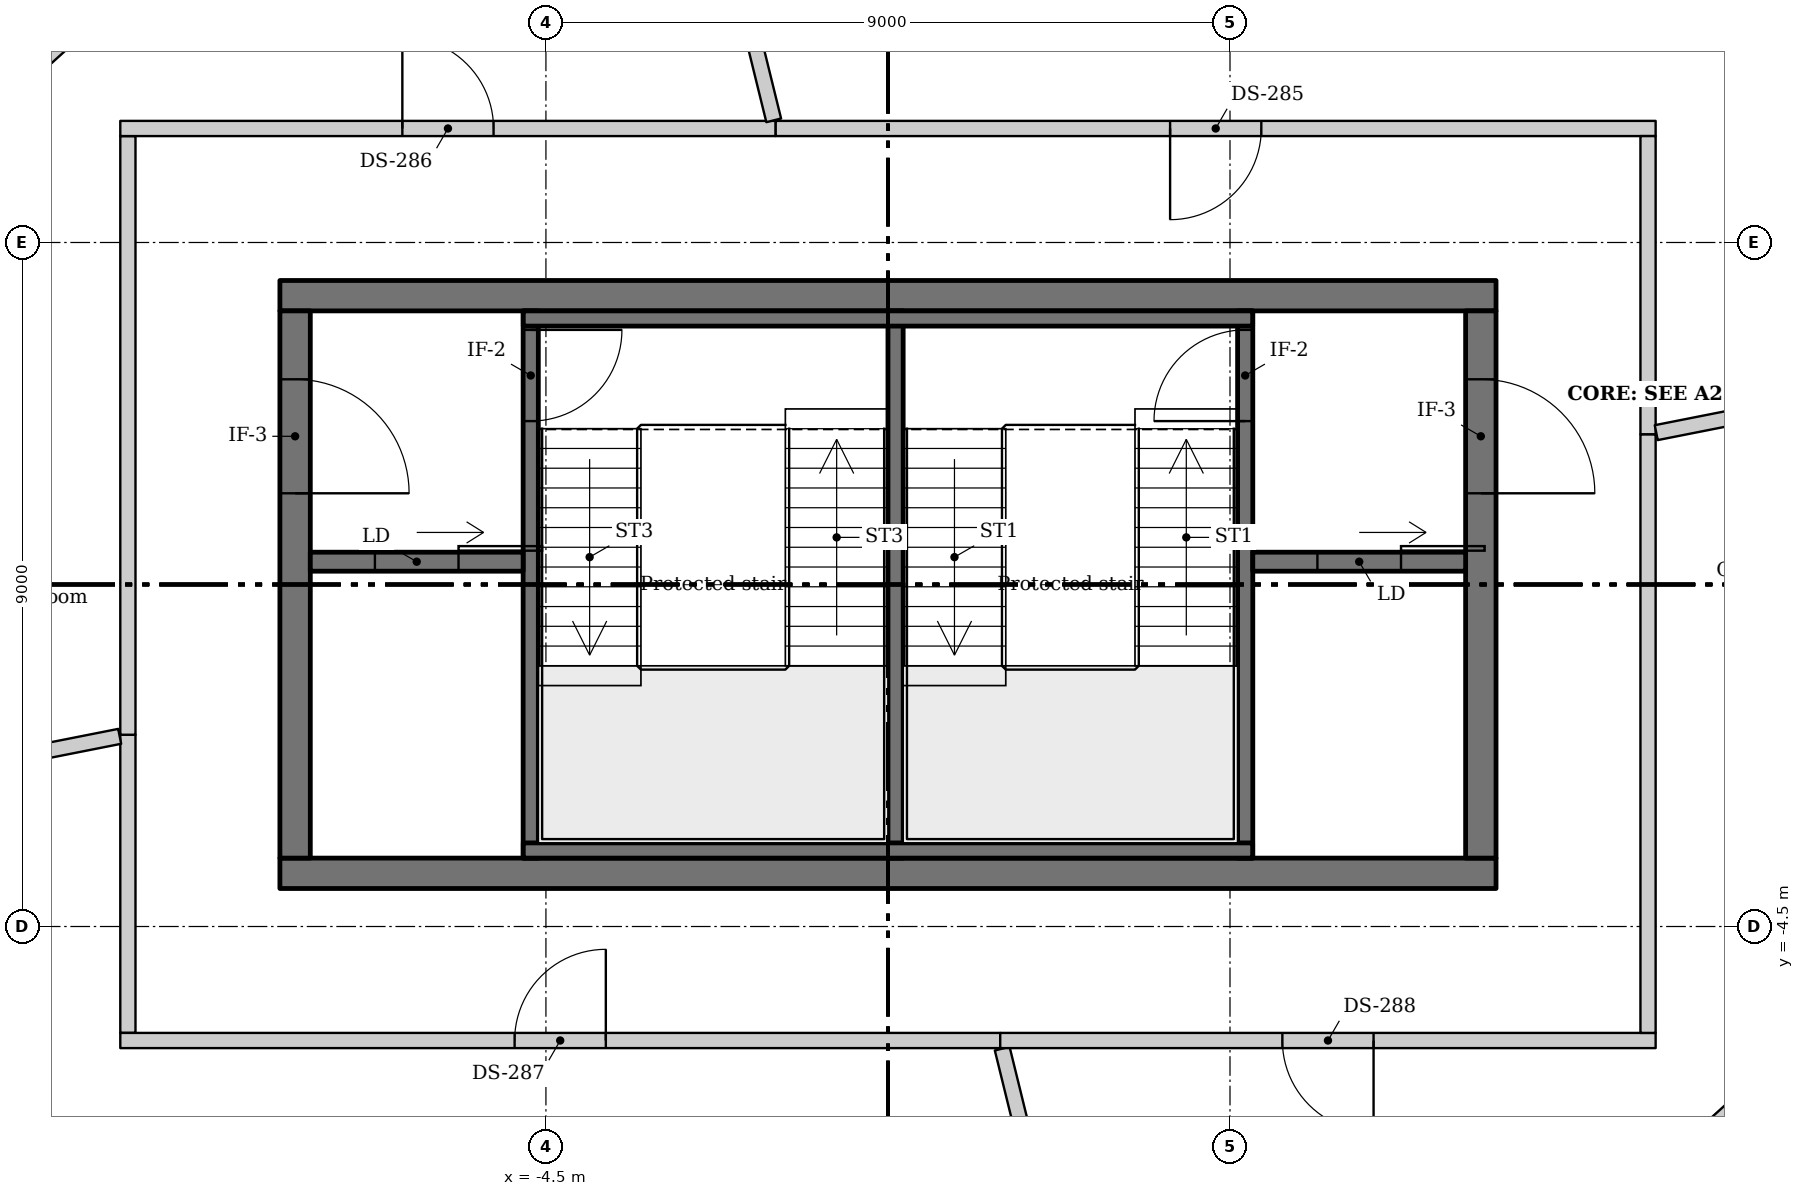
"""IFC4 building model, lengths in metres.
Left out: names, types, materials, properties, quantities, classifications, styles, units other than length and angle.
Written with IfcOpenShell. Run it as: python <this file> out.ifc"""

import sys

from ifc_helpers import new_model, si_unit, direction, frame, frame_2d, origin, place, context, subcontext, project, spatial, rectangle, extrude, source, transform, mapped, element, fill, save


model = new_model("IFC4")
c1 = context("Model", 3, precision=1e-05, world=origin(), true_north=direction((0.0, 1.0)))
c2 = subcontext(c1, "Body", "Model", "MODEL_VIEW")
j1 = project(units=[si_unit("LENGTHUNIT", "METRE"), si_unit("PLANEANGLEUNIT", "RADIAN")], contexts=[c1])
p1 = place(None, origin())
s1 = spatial("IfcSite", under=j1, at=p1, CompositionType="ELEMENT")
p2 = place(p1, origin())
s2 = spatial("IfcBuilding", under=s1, at=p2, CompositionType="ELEMENT")
p3 = place(p2, frame((0.0, 0.0, 361.0)))
s3 = spatial("IfcBuildingStorey", under=s2, at=p3, CompositionType="ELEMENT", Elevation=361.0)
m1 = source(origin(), c2, "Body", "SweptSolid", [
    extrude(rectangle(XDim=16.0, YDim=0.4, at=frame_2d((8.0, 0.0))), origin(), (0.0, 0.0, 1.0), 4.5),
])
for number, where, z_axis, x_axis in (
    (1, (-8.0, 3.8, -0.25), (0.0, 0.0, 1.0), (1.0, 0.0, 0.0)),
    (2, (-8.0, -3.8, -0.25), (0.0, 0.0, 1.0), (1.0, 0.0, 0.0)),
):
    element("IfcWall", number, at=place(p3, frame(where, z_axis=z_axis, x_axis=x_axis)), inside=s3, PredefinedType="SHEAR", context=c2, shape_type="MappedRepresentation", body=[
        mapped(m1, transform((0.0, 0.0, 0.0))),
    ])
m2 = source(origin(), c2, "Body", "SweptSolid", [
    extrude(rectangle(XDim=7.2, YDim=0.4, at=frame_2d((3.6, 0.0))), origin(), (0.0, 0.0, 1.0), 4.5),
])
p4 = place(p3, frame((7.8, -3.6, -0.25), z_axis=(0.0, 0.0, 1.0), x_axis=(0.0, 1.0, 0.0)))
e3 = element("IfcWall", 3, at=p4, inside=s3, PredefinedType="SHEAR", context=c2, shape_type="MappedRepresentation", body=[
    mapped(m2, transform((0.0, 0.0, 0.0))),
])
m3 = source(origin(), c2, "Body", "SweptSolid", [
    extrude(rectangle(XDim=1.5, YDim=2.1, at=frame_2d((0.75, 1.05))), frame((0.0, 0.21, 0.0), z_axis=(0.0, -1.0, 0.0), x_axis=(1.0, 0.0, 0.0)), (0.0, 0.0, 1.0), 0.42),
])
p5 = place(p4, frame((4.8, 0.0, 0.25)))
e4 = element("IfcOpeningElement", 4, at=p5, cuts=e3, PredefinedType="OPENING", context=c2, shape_type="MappedRepresentation", body=[
    mapped(m3, transform((0.0, 0.0, 0.0))),
])
p6 = place(p3, frame((-7.8, -3.6, -0.25), z_axis=(0.0, 0.0, 1.0), x_axis=(0.0, 1.0, 0.0)))
e5 = element("IfcWall", 5, at=p6, inside=s3, PredefinedType="SHEAR", context=c2, shape_type="MappedRepresentation", body=[
    mapped(m2, transform((0.0, 0.0, 0.0))),
])
p7 = place(p6, frame((4.8, 0.0, 0.25)))
e6 = element("IfcOpeningElement", 6, at=p7, cuts=e5, PredefinedType="OPENING", context=c2, shape_type="MappedRepresentation", body=[
    mapped(m3, transform((0.0, 0.0, 0.0))),
])
m4 = source(origin(), c2, "Body", "SweptSolid", [
    extrude(rectangle(XDim=3.645, YDim=0.2, at=frame_2d((1.823, 0.0))), origin(), (0.0, 0.0, 1.0), 4.25),
])
p8 = place(p3, frame((8.09, 9.132, 0.0), z_axis=(0.0, 0.0, 1.0), x_axis=(0.826956398418, -0.562266053675, 0.0)))
e7 = element("IfcWall", 7, at=p8, inside=s3, PredefinedType="SOLIDWALL", context=c2, shape_type="MappedRepresentation", body=[
    mapped(m4, transform((0.0, 0.0, 0.0))),
])
m5 = source(origin(), c2, "Body", "SweptSolid", [
    extrude(rectangle(XDim=3.619, YDim=0.2, at=frame_2d((1.81, 0.0))), origin(), (0.0, 0.0, 1.0), 4.25),
])
p9 = place(p3, frame((-12.359, 5.767, 0.0), z_axis=(0.0, 0.0, 1.0), x_axis=(0.741120145492, 0.671372422688, 0.0)))
e8 = element("IfcWall", 8, at=p9, inside=s3, PredefinedType="SOLIDWALL", context=c2, shape_type="MappedRepresentation", body=[
    mapped(m5, transform((0.0, 0.0, 0.0))),
])
p10 = place(p3, frame((-8.09, -9.132, 0.0), z_axis=(0.0, 0.0, 1.0), x_axis=(-0.826956398418, 0.562266053675, 0.0)))
e9 = element("IfcWall", 9, at=p10, inside=s3, PredefinedType="SOLIDWALL", context=c2, shape_type="MappedRepresentation", body=[
    mapped(m4, transform((0.0, 0.0, 0.0))),
])
p11 = place(p3, frame((12.359, -5.767, 0.0), z_axis=(0.0, 0.0, 1.0), x_axis=(-0.741120145492, -0.671372422688, 0.0)))
e10 = element("IfcWall", 10, at=p11, inside=s3, PredefinedType="SOLIDWALL", context=c2, shape_type="MappedRepresentation", body=[
    mapped(m5, transform((0.0, 0.0, 0.0))),
])
m6 = source(origin(), c2, "Body", "SweptSolid", [
    extrude(rectangle(XDim=7.2, YDim=0.2, at=frame_2d((3.6, 0.0))), origin(), (0.0, 0.0, 1.0), 4.25),
])
p12 = place(p3, frame((0.1, 3.6, 0.0), z_axis=(0.0, 0.0, 1.0), x_axis=(0.0, -1.0, 0.0)))
e11 = element("IfcWall", 11, at=p12, inside=s3, PredefinedType="SHEAR", context=c2, shape_type="MappedRepresentation", body=[
    mapped(m6, transform((0.0, 0.0, 0.0))),
])
p13 = place(p3, frame((4.7, -3.6, 0.0), z_axis=(0.0, 0.0, 1.0), x_axis=(0.0, 1.0, 0.0)))
e12 = element("IfcWall", 12, at=p13, inside=s3, PredefinedType="SHEAR", context=c2, shape_type="MappedRepresentation", body=[
    mapped(m6, transform((0.0, 0.0, 0.0))),
])
m7 = source(origin(), c2, "Body", "SweptSolid", [
    extrude(rectangle(XDim=1.2, YDim=2.1, at=frame_2d((0.6, 1.05))), frame((0.0, 0.11, 0.0), z_axis=(0.0, -1.0, 0.0), x_axis=(1.0, 0.0, 0.0)), (0.0, 0.0, 1.0), 0.22),
])
p14 = place(p13, frame((5.75, 0.0, 0.0)))
e13 = element("IfcOpeningElement", 13, at=p14, cuts=e12, PredefinedType="OPENING", context=c2, shape_type="MappedRepresentation", body=[
    mapped(m7, transform((0.0, 0.0, 0.0))),
])
p15 = place(p3, frame((-4.7, 3.6, 0.0), z_axis=(0.0, 0.0, 1.0), x_axis=(0.0, -1.0, 0.0)))
e14 = element("IfcWall", 14, at=p15, inside=s3, PredefinedType="SHEAR", context=c2, shape_type="MappedRepresentation", body=[
    mapped(m6, transform((0.0, 0.0, 0.0))),
])
p16 = place(p15, frame((0.25, 0.0, 0.0)))
e15 = element("IfcOpeningElement", 15, at=p16, cuts=e14, PredefinedType="OPENING", context=c2, shape_type="MappedRepresentation", body=[
    mapped(m7, transform((0.0, 0.0, 0.0))),
])
m8 = source(origin(), c2, "Body", "SweptSolid", [
    extrude(rectangle(XDim=2.8, YDim=0.25, at=frame_2d((1.4, 0.0))), origin(), (0.0, 0.0, 1.0), 4.25),
])
p17 = place(p3, frame((7.6, 0.3, 0.0), z_axis=(0.0, 0.0, 1.0), x_axis=(-1.0, 0.0, 0.0)))
e16 = element("IfcWall", 16, at=p17, inside=s3, PredefinedType="SHEAR", context=c2, shape_type="MappedRepresentation", body=[
    mapped(m8, transform((0.0, 0.0, 0.0))),
])
m9 = source(origin(), c2, "Body", "SweptSolid", [
    extrude(rectangle(XDim=1.1, YDim=2.1, at=frame_2d((0.55, 1.05))), frame((0.0, 0.135, 0.0), z_axis=(0.0, -1.0, 0.0), x_axis=(1.0, 0.0, 0.0)), (0.0, 0.0, 1.0), 0.27),
])
p18 = place(p17, frame((0.85, 0.0, 0.0)))
e17 = element("IfcOpeningElement", 17, at=p18, cuts=e16, PredefinedType="OPENING", context=c2, shape_type="MappedRepresentation", body=[
    mapped(m9, transform((0.0, 0.0, 0.0))),
])
p19 = place(p3, frame((-4.8, 0.3, 0.0), z_axis=(0.0, 0.0, 1.0), x_axis=(-1.0, 0.0, 0.0)))
e18 = element("IfcWall", 18, at=p19, inside=s3, PredefinedType="SHEAR", context=c2, shape_type="MappedRepresentation", body=[
    mapped(m8, transform((0.0, 0.0, 0.0))),
])
p20 = place(p19, frame((0.85, 0.0, 0.0)))
e19 = element("IfcOpeningElement", 19, at=p20, cuts=e18, PredefinedType="OPENING", context=c2, shape_type="MappedRepresentation", body=[
    mapped(m9, transform((0.0, 0.0, 0.0))),
])
m10 = source(origin(), c2, "Body", "SweptSolid", [
    extrude(rectangle(XDim=9.596, YDim=0.2, at=frame_2d((4.798, 0.0))), origin(), (0.0, 0.0, 1.0), 4.25),
])
for number, where, z_axis, x_axis in (
    (20, (-4.798, -3.5, 0.0), (0.0, 0.0, 1.0), (1.0, 0.0, 0.0)),
    (21, (4.798, 3.5, 0.0), (0.0, 0.0, 1.0), (-1.0, 0.0, 0.0)),
):
    element("IfcWall", number, at=place(p3, frame(where, z_axis=z_axis, x_axis=x_axis)), inside=s3, PredefinedType="SHEAR", context=c2, shape_type="MappedRepresentation", body=[
        mapped(m10, transform((0.0, 0.0, 0.0))),
    ])
m11 = source(origin(), c2, "Body", "SweptSolid", [
    extrude(rectangle(XDim=3.923, YDim=0.2, at=frame_2d((1.961, 0.0))), origin(), (0.0, 0.0, 1.0), 4.25),
])
p21 = place(p3, frame((-10.0, -5.9, 0.0), z_axis=(0.0, 0.0, 1.0), x_axis=(0.0, 1.0, 0.0)))
e22 = element("IfcWall", 22, at=p21, inside=s3, PredefinedType="PARTITIONING", context=c2, shape_type="MappedRepresentation", body=[
    mapped(m11, transform((0.0, 0.0, 0.0))),
])
m12 = source(origin(), c2, "Body", "SweptSolid", [
    extrude(rectangle(XDim=3.737, YDim=0.2, at=frame_2d((1.869, 0.0))), origin(), (0.0, 0.0, 1.0), 4.25),
])
p22 = place(p3, frame((-10.108, -1.998, 0.0), z_axis=(0.0, 0.0, 1.0), x_axis=(-0.981007998173, -0.193967284668, 0.0)))
e23 = element("IfcWall", 23, at=p22, inside=s3, PredefinedType="PARTITIONING", context=c2, shape_type="MappedRepresentation", body=[
    mapped(m12, transform((0.0, 0.0, 0.0))),
])
m13 = source(origin(), c2, "Body", "SweptSolid", [
    extrude(rectangle(XDim=7.877, YDim=0.2, at=frame_2d((3.938, 0.0))), origin(), (0.0, 0.0, 1.0), 4.25),
])
p23 = place(p3, frame((-10.0, -1.977, 0.0), z_axis=(0.0, 0.0, 1.0), x_axis=(0.0, 1.0, 0.0)))
e24 = element("IfcWall", 24, at=p23, inside=s3, PredefinedType="PARTITIONING", context=c2, shape_type="MappedRepresentation", body=[
    mapped(m13, transform((0.0, 0.0, 0.0))),
])
m14 = source(origin(), c2, "Body", "SweptSolid", [
    extrude(rectangle(XDim=8.623, YDim=0.2, at=frame_2d((4.312, 0.0))), origin(), (0.0, 0.0, 1.0), 4.25),
])
p24 = place(p3, frame((-10.1, 6.0, 0.0), z_axis=(0.0, 0.0, 1.0), x_axis=(1.0, 0.0, 0.0)))
e25 = element("IfcWall", 25, at=p24, inside=s3, PredefinedType="PARTITIONING", context=c2, shape_type="MappedRepresentation", body=[
    mapped(m14, transform((0.0, 0.0, 0.0))),
])
p25 = place(p24, frame((3.711, 0.0, 0.0)))
e26 = element("IfcOpeningElement", 26, at=p25, cuts=e25, PredefinedType="OPENING", context=c2, shape_type="MappedRepresentation", body=[
    mapped(m7, transform((0.0, 0.0, 0.0))),
])
m15 = source(origin(), c2, "Body", "SweptSolid", [
    extrude(rectangle(XDim=4.735, YDim=0.2, at=frame_2d((2.368, 0.0))), origin(), (0.0, 0.0, 1.0), 4.25),
])
p26 = place(p3, frame((-1.503, 6.107, 0.0), z_axis=(0.0, 0.0, 1.0), x_axis=(-0.239064665941, 0.971003648551, 0.0)))
e27 = element("IfcWall", 27, at=p26, inside=s3, PredefinedType="PARTITIONING", context=c2, shape_type="MappedRepresentation", body=[
    mapped(m15, transform((0.0, 0.0, 0.0))),
])
m16 = source(origin(), c2, "Body", "SweptSolid", [
    extrude(rectangle(XDim=11.577, YDim=0.2, at=frame_2d((5.789, 0.0))), origin(), (0.0, 0.0, 1.0), 4.25),
])
p27 = place(p3, frame((-1.477, 6.0, 0.0), z_axis=(0.0, 0.0, 1.0), x_axis=(1.0, 0.0, 0.0)))
e28 = element("IfcWall", 28, at=p27, inside=s3, PredefinedType="PARTITIONING", context=c2, shape_type="MappedRepresentation", body=[
    mapped(m16, transform((0.0, 0.0, 0.0))),
])
p28 = place(p27, frame((5.189, 0.0, 0.0)))
e29 = element("IfcOpeningElement", 29, at=p28, cuts=e28, PredefinedType="OPENING", context=c2, shape_type="MappedRepresentation", body=[
    mapped(m7, transform((0.0, 0.0, 0.0))),
])
p29 = place(p3, frame((1.477, -6.0, 0.0), z_axis=(0.0, 0.0, 1.0), x_axis=(-1.0, 0.0, 0.0)))
e30 = element("IfcWall", 30, at=p29, inside=s3, PredefinedType="PARTITIONING", context=c2, shape_type="MappedRepresentation", body=[
    mapped(m16, transform((0.0, 0.0, 0.0))),
])
p30 = place(p29, frame((5.189, 0.0, 0.0)))
e31 = element("IfcOpeningElement", 31, at=p30, cuts=e30, PredefinedType="OPENING", context=c2, shape_type="MappedRepresentation", body=[
    mapped(m7, transform((0.0, 0.0, 0.0))),
])
p31 = place(p3, frame((1.503, -6.107, 0.0), z_axis=(0.0, 0.0, 1.0), x_axis=(0.239064665941, -0.971003648551, 0.0)))
e32 = element("IfcWall", 32, at=p31, inside=s3, PredefinedType="PARTITIONING", context=c2, shape_type="MappedRepresentation", body=[
    mapped(m15, transform((0.0, 0.0, 0.0))),
])
p32 = place(p3, frame((10.1, -6.0, 0.0), z_axis=(0.0, 0.0, 1.0), x_axis=(-1.0, 0.0, 0.0)))
e33 = element("IfcWall", 33, at=p32, inside=s3, PredefinedType="PARTITIONING", context=c2, shape_type="MappedRepresentation", body=[
    mapped(m14, transform((0.0, 0.0, 0.0))),
])
p33 = place(p32, frame((3.711, 0.0, 0.0)))
e34 = element("IfcOpeningElement", 34, at=p33, cuts=e33, PredefinedType="OPENING", context=c2, shape_type="MappedRepresentation", body=[
    mapped(m7, transform((0.0, 0.0, 0.0))),
])
p34 = place(p3, frame((10.0, 1.977, 0.0), z_axis=(0.0, 0.0, 1.0), x_axis=(0.0, -1.0, 0.0)))
e35 = element("IfcWall", 35, at=p34, inside=s3, PredefinedType="PARTITIONING", context=c2, shape_type="MappedRepresentation", body=[
    mapped(m13, transform((0.0, 0.0, 0.0))),
])
p35 = place(p3, frame((10.0, 5.9, 0.0), z_axis=(0.0, 0.0, 1.0), x_axis=(0.0, -1.0, 0.0)))
e36 = element("IfcWall", 36, at=p35, inside=s3, PredefinedType="PARTITIONING", context=c2, shape_type="MappedRepresentation", body=[
    mapped(m11, transform((0.0, 0.0, 0.0))),
])
p36 = place(p3, frame((13.774, 2.723, 0.0), z_axis=(0.0, 0.0, 1.0), x_axis=(-0.981007998173, -0.193967284668, 0.0)))
e37 = element("IfcWall", 37, at=p36, inside=s3, PredefinedType="PARTITIONING", context=c2, shape_type="MappedRepresentation", body=[
    mapped(m12, transform((0.0, 0.0, 0.0))),
])
m17 = source(origin(), c2, "Body", "SweptSolid", [
    extrude(rectangle(XDim=1.1, YDim=2.1, at=frame_2d((0.55, 1.05))), frame((0.0, 0.025, 0.0), z_axis=(0.0, -1.0, 0.0), x_axis=(1.0, 0.0, 0.0)), (0.0, 0.0, 1.0), 0.05),
])
p37 = place(p18, origin())
e38 = element("IfcDoor", 38, at=p37, inside=s3, OperationType="SLIDING_TO_LEFT", PredefinedType="DOOR", context=c2, shape_type="MappedRepresentation", body=[
    mapped(m17, transform((0.0, 0.0, 0.0))),
])
fill(e17, e38)
m18 = source(origin(), c2, "Body", "SweptSolid", [
    extrude(rectangle(XDim=1.2, YDim=2.1, at=frame_2d((0.6, 1.05))), frame((0.0, 0.025, 0.0), z_axis=(0.0, -1.0, 0.0), x_axis=(1.0, 0.0, 0.0)), (0.0, 0.0, 1.0), 0.05),
])
p38 = place(p14, origin())
e39 = element("IfcDoor", 39, at=p38, inside=s3, OperationType="SINGLE_SWING_LEFT", PredefinedType="DOOR", context=c2, shape_type="MappedRepresentation", body=[
    mapped(m18, transform((0.0, 0.0, 0.0))),
])
fill(e13, e39)
p39 = place(p20, origin())
e40 = element("IfcDoor", 40, at=p39, inside=s3, OperationType="SLIDING_TO_LEFT", PredefinedType="DOOR", context=c2, shape_type="MappedRepresentation", body=[
    mapped(m17, transform((0.0, 0.0, 0.0))),
])
fill(e19, e40)
p40 = place(p16, origin())
e41 = element("IfcDoor", 41, at=p40, inside=s3, OperationType="SINGLE_SWING_RIGHT", PredefinedType="DOOR", context=c2, shape_type="MappedRepresentation", body=[
    mapped(m18, transform((0.0, 0.0, 0.0))),
])
fill(e15, e41)
m19 = source(origin(), c2, "Body", "SweptSolid", [
    extrude(rectangle(XDim=1.5, YDim=2.1, at=frame_2d((0.75, 1.05))), frame((0.0, 0.025, 0.0), z_axis=(0.0, -1.0, 0.0), x_axis=(1.0, 0.0, 0.0)), (0.0, 0.0, 1.0), 0.05),
])
p41 = place(p5, origin())
e42 = element("IfcDoor", 42, at=p41, inside=s3, OperationType="DOUBLE_DOOR_SINGLE_SWING", PredefinedType="DOOR", context=c2, shape_type="MappedRepresentation", body=[
    mapped(m19, transform((0.0, 0.0, 0.0))),
])
fill(e4, e42)
p42 = place(p7, origin())
e43 = element("IfcDoor", 43, at=p42, inside=s3, OperationType="DOUBLE_DOOR_SINGLE_SWING", PredefinedType="DOOR", context=c2, shape_type="MappedRepresentation", body=[
    mapped(m19, transform((0.0, 0.0, 0.0))),
])
fill(e6, e43)
m20 = source(origin(), c2, "Body", "SweptSolid", [
    extrude(rectangle(XDim=1.2, YDim=2.1, at=frame_2d((0.6, 1.05))), frame((0.0, 0.025, 0.0), z_axis=(0.0, -1.0, 0.0), x_axis=(1.0, 0.0, 0.0)), (0.0, 0.0, 1.0), 0.05),
])
p43 = place(p28, origin())
e44 = element("IfcDoor", 44, at=p43, inside=s3, OperationType="SINGLE_SWING_LEFT", PredefinedType="DOOR", context=c2, shape_type="MappedRepresentation", body=[
    mapped(m20, transform((0.0, 0.0, 0.0))),
])
fill(e29, e44)
p44 = place(p25, origin())
e45 = element("IfcDoor", 45, at=p44, inside=s3, OperationType="SINGLE_SWING_LEFT", PredefinedType="DOOR", context=c2, shape_type="MappedRepresentation", body=[
    mapped(m20, transform((0.0, 0.0, 0.0))),
])
fill(e26, e45)
p45 = place(p30, origin())
e46 = element("IfcDoor", 46, at=p45, inside=s3, OperationType="SINGLE_SWING_LEFT", PredefinedType="DOOR", context=c2, shape_type="MappedRepresentation", body=[
    mapped(m20, transform((0.0, 0.0, 0.0))),
])
fill(e31, e46)
p46 = place(p33, origin())
e47 = element("IfcDoor", 47, at=p46, inside=s3, OperationType="SINGLE_SWING_LEFT", PredefinedType="DOOR", context=c2, shape_type="MappedRepresentation", body=[
    mapped(m20, transform((0.0, 0.0, 0.0))),
])
fill(e34, e47)
save(model, sys.argv[1])
